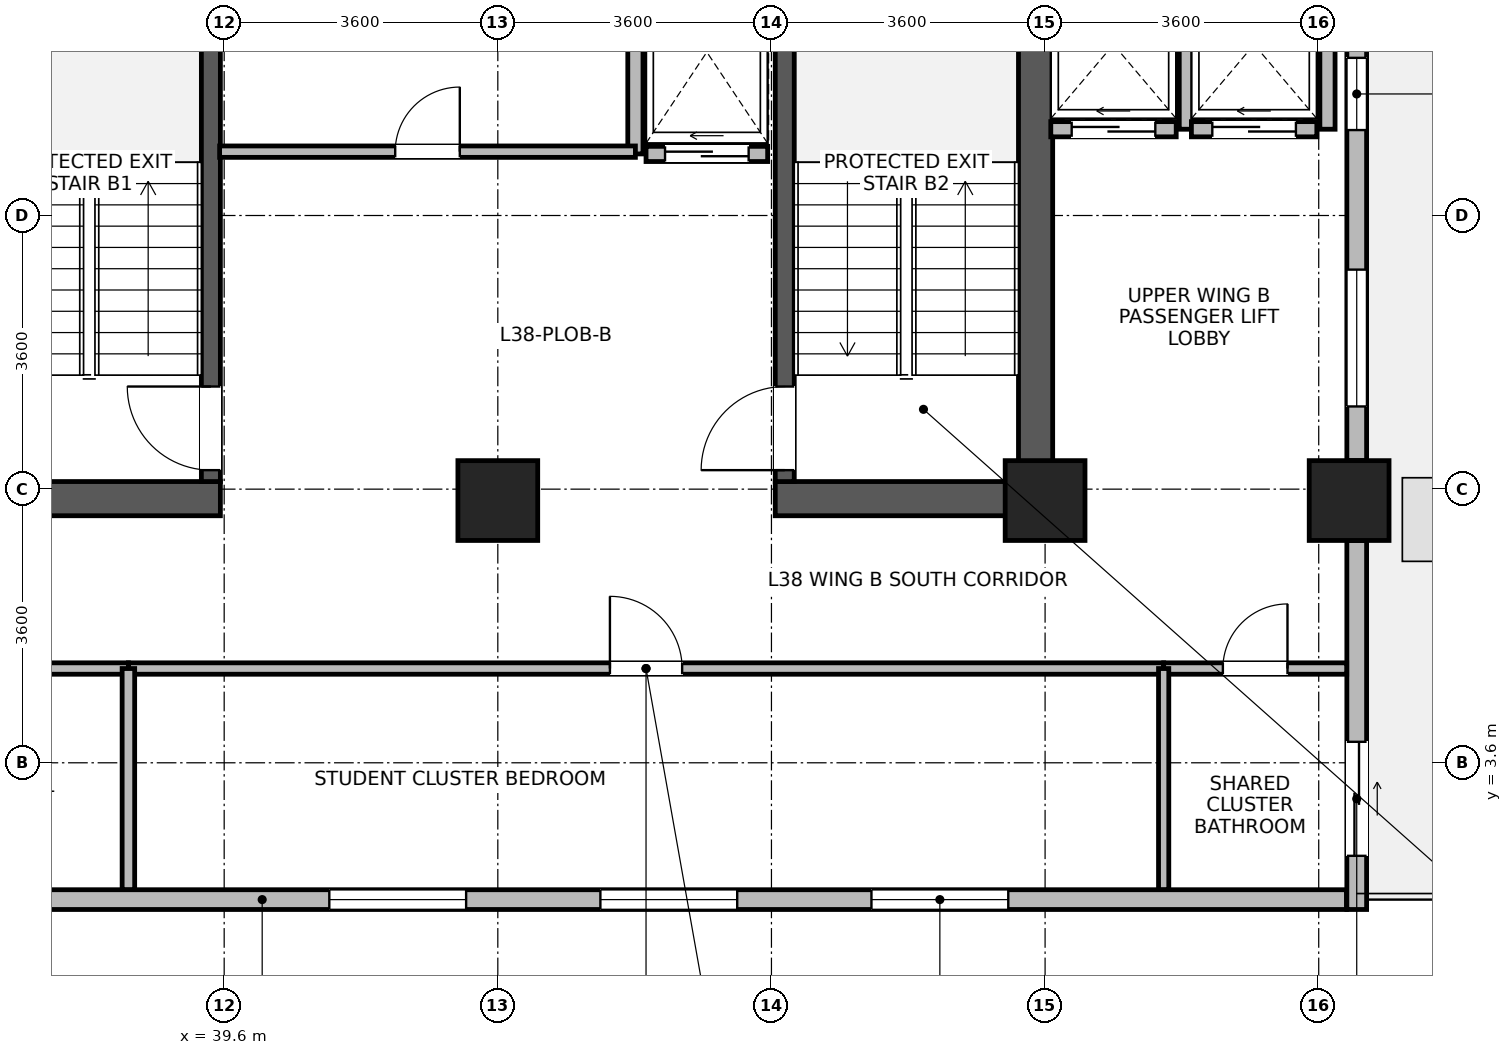
"""IFC4 building model, lengths in metres.
Left out: names, types, materials, properties, quantities, classifications, styles, units other than length and angle.
Written with IfcOpenShell. Run it as: python <this file> out.ifc"""

import sys

from ifc_helpers import new_model, si_unit, direction, frame, frame_2d, origin, origin_2d, place, context, subcontext, project, spatial, rectangle, extrude, source, transform, mapped, element, fill, save


model = new_model("IFC4")
c1 = context("Model", 3, precision=1e-05, world=origin(), true_north=direction((0.0, 1.0)))
c2 = subcontext(c1, "Body", "Model", "MODEL_VIEW")
j1 = project(units=[si_unit("LENGTHUNIT", "METRE"), si_unit("PLANEANGLEUNIT", "RADIAN")], contexts=[c1])
p1 = place(None, origin())
s1 = spatial("IfcSite", under=j1, at=p1, CompositionType="ELEMENT")
p2 = place(p1, origin())
s2 = spatial("IfcBuilding", under=s1, at=p2, CompositionType="ELEMENT")
p3 = place(p2, frame((0.0, 0.0, 151.3)))
s3 = spatial("IfcBuildingStorey", under=s2, at=p3, CompositionType="ELEMENT", Elevation=151.3)
p4 = place(p3, frame((50.275, 6.85, 0.0), z_axis=(0.0, 0.0, 1.0), x_axis=(0.0, 1.0, 0.0)))
e1 = element("IfcWall", 1, at=p4, inside=s3, PredefinedType="SHEAR", context=c2, shape_type="SweptSolid", body=[
    extrude(rectangle(XDim=7.9, YDim=0.45, at=frame_2d((3.95, 0.0))), origin(), (0.0, 0.0, 1.0), 3.46),
])
for number, where, z_axis, x_axis in (
    (2, (36.35, 7.075, 0.0), (0.0, 0.0, 1.0), (1.0, 0.0, 0.0)),
    (3, (46.85, 7.075, 0.0), (0.0, 0.0, 1.0), (1.0, 0.0, 0.0)),
):
    element("IfcWall", number, at=place(p3, frame(where, z_axis=z_axis, x_axis=x_axis)), inside=s3, PredefinedType="SHEAR", context=c2, shape_type="SweptSolid", body=[
        extrude(rectangle(XDim=3.2, YDim=0.45, at=frame_2d((1.6, 0.0))), origin(), (0.0, 0.0, 1.0), 3.46),
    ])
p5 = place(p3, frame((39.425, 7.3, 0.0), z_axis=(0.0, 0.0, 1.0), x_axis=(0.0, 1.0, 0.0)))
e4 = element("IfcWall", 4, at=p5, inside=s3, PredefinedType="SHEAR", context=c2, shape_type="SweptSolid", body=[
    extrude(rectangle(XDim=7.0, YDim=0.25, at=frame_2d((3.5, 0.0))), origin(), (0.0, 0.0, 1.0), 3.46),
])
p6 = place(p5, frame((0.15, 0.0, 0.0)))
e5 = element("IfcOpeningElement", 5, at=p6, cuts=e4, PredefinedType="OPENING", context=c2, shape_type="SweptSolid", body=[
    extrude(rectangle(XDim=1.1, YDim=2.08, at=frame_2d((0.55, 1.04))), frame((0.0, 0.135, 0.0), z_axis=(0.0, -1.0, 0.0), x_axis=(1.0, 0.0, 0.0)), (0.0, 0.0, 1.0), 0.27),
])
p7 = place(p3, frame((46.975, 7.3, 0.0), z_axis=(0.0, 0.0, 1.0), x_axis=(0.0, 1.0, 0.0)))
e6 = element("IfcWall", 6, at=p7, inside=s3, PredefinedType="SHEAR", context=c2, shape_type="SweptSolid", body=[
    extrude(rectangle(XDim=7.0, YDim=0.25, at=frame_2d((3.5, 0.0))), origin(), (0.0, 0.0, 1.0), 3.46),
])
p8 = place(p7, frame((0.15, 0.0, 0.0)))
e7 = element("IfcOpeningElement", 7, at=p8, cuts=e6, PredefinedType="OPENING", context=c2, shape_type="SweptSolid", body=[
    extrude(rectangle(XDim=1.1, YDim=2.08, at=frame_2d((0.55, 1.04))), frame((0.0, 0.135, 0.0), z_axis=(0.0, -1.0, 0.0), x_axis=(1.0, 0.0, 0.0)), (0.0, 0.0, 1.0), 0.27),
])
m1 = source(origin(), c2, "Body", "SweptSolid", [
    extrude(rectangle(XDim=1.05, YDim=1.05, at=origin_2d()), origin(), (0.0, 0.0, 1.0), 3.7),
])
for number, where, z_axis, x_axis in (
    (8, (43.2, 7.05, 0.0), (0.0, 0.0, 1.0), (1.0, 0.0, 0.0)),
    (9, (50.4, 7.05, 0.0), (0.0, 0.0, 1.0), (1.0, 0.0, 0.0)),
    (10, (54.4, 7.05, 0.0), (0.0, 0.0, 1.0), (1.0, 0.0, 0.0)),
):
    element("IfcColumn", number, at=place(p3, frame(where, z_axis=z_axis, x_axis=x_axis)), inside=s3, PredefinedType="COLUMN", context=c2, shape_type="MappedRepresentation", body=[
        mapped(m1, transform((0.0, 0.0, 0.0), x_axis=(1.0, 0.0, 0.0), y_axis=(0.0, 1.0, 0.0), z_axis=(0.0, 0.0, 1.0), scale=1.0)),
    ])
p9 = place(p3, frame((54.365, 1.8, 0.0), z_axis=(0.0, 0.0, 1.0), x_axis=(-1.0, 0.0, 0.0)))
e11 = element("IfcWall", 11, at=p9, inside=s3, PredefinedType="STANDARD", context=c2, shape_type="SweptSolid", body=[
    extrude(rectangle(XDim=28.53, YDim=0.26, at=frame_2d((14.265, 0.0))), origin(), (0.0, 0.0, 1.0), 3.44),
])
p10 = place(p9, frame((4.449, 0.0, 0.85)))
e12 = element("IfcOpeningElement", 12, at=p10, cuts=e11, PredefinedType="OPENING", context=c2, shape_type="SweptSolid", body=[
    extrude(rectangle(XDim=1.8, YDim=1.85, at=frame_2d((0.9, 0.925))), frame((0.0, 0.14, 0.0), z_axis=(0.0, -1.0, 0.0), x_axis=(1.0, 0.0, 0.0)), (0.0, 0.0, 1.0), 0.28),
])
p11 = place(p9, frame((8.016, 0.0, 0.85)))
e13 = element("IfcOpeningElement", 13, at=p11, cuts=e11, PredefinedType="OPENING", context=c2, shape_type="SweptSolid", body=[
    extrude(rectangle(XDim=1.8, YDim=1.85, at=frame_2d((0.9, 0.925))), frame((0.0, 0.14, 0.0), z_axis=(0.0, -1.0, 0.0), x_axis=(1.0, 0.0, 0.0)), (0.0, 0.0, 1.0), 0.28),
])
p12 = place(p9, frame((11.582, 0.0, 0.85)))
e14 = element("IfcOpeningElement", 14, at=p12, cuts=e11, PredefinedType="OPENING", context=c2, shape_type="SweptSolid", body=[
    extrude(rectangle(XDim=1.8, YDim=1.85, at=frame_2d((0.9, 0.925))), frame((0.0, 0.14, 0.0), z_axis=(0.0, -1.0, 0.0), x_axis=(1.0, 0.0, 0.0)), (0.0, 0.0, 1.0), 0.28),
])
p13 = place(p9, frame((18.714, 0.0, 0.85)))
e15 = element("IfcOpeningElement", 15, at=p13, cuts=e11, PredefinedType="OPENING", context=c2, shape_type="SweptSolid", body=[
    extrude(rectangle(XDim=1.8, YDim=1.85, at=frame_2d((0.9, 0.925))), frame((0.0, 0.14, 0.0), z_axis=(0.0, -1.0, 0.0), x_axis=(1.0, 0.0, 0.0)), (0.0, 0.0, 1.0), 0.28),
])
p14 = place(p9, frame((22.281, 0.0, 0.85)))
e16 = element("IfcOpeningElement", 16, at=p14, cuts=e11, PredefinedType="OPENING", context=c2, shape_type="SweptSolid", body=[
    extrude(rectangle(XDim=1.8, YDim=1.85, at=frame_2d((0.9, 0.925))), frame((0.0, 0.14, 0.0), z_axis=(0.0, -1.0, 0.0), x_axis=(1.0, 0.0, 0.0)), (0.0, 0.0, 1.0), 0.28),
])
p15 = place(p9, frame((25.847, 0.0, 0.85)))
e17 = element("IfcOpeningElement", 17, at=p15, cuts=e11, PredefinedType="OPENING", context=c2, shape_type="SweptSolid", body=[
    extrude(rectangle(XDim=1.8, YDim=1.85, at=frame_2d((0.9, 0.925))), frame((0.0, 0.14, 0.0), z_axis=(0.0, -1.0, 0.0), x_axis=(1.0, 0.0, 0.0)), (0.0, 0.0, 1.0), 0.28),
])
p16 = place(p3, frame((54.5, 6.524, 0.0), z_axis=(0.0, 0.0, 1.0), x_axis=(0.0, -1.0, 0.0)))
e18 = element("IfcWall", 18, at=p16, inside=s3, PredefinedType="STANDARD", context=c2, shape_type="SweptSolid", body=[
    extrude(rectangle(XDim=4.854, YDim=0.26, at=frame_2d((2.427, 0.0))), origin(), (0.0, 0.0, 1.0), 3.44),
])
p17 = place(p16, frame((2.648, 0.0, 0.0)))
e19 = element("IfcOpeningElement", 19, at=p17, cuts=e18, PredefinedType="OPENING", context=c2, shape_type="SweptSolid", body=[
    extrude(rectangle(XDim=1.5, YDim=2.15, at=frame_2d((0.75, 1.075))), frame((0.0, 0.14, 0.0), z_axis=(0.0, -1.0, 0.0), x_axis=(1.0, 0.0, 0.0)), (0.0, 0.0, 1.0), 0.28),
])
p18 = place(p3, frame((54.5, 14.024, 0.0), z_axis=(0.0, 0.0, 1.0), x_axis=(0.0, -1.0, 0.0)))
e20 = element("IfcWall", 20, at=p18, inside=s3, PredefinedType="STANDARD", context=c2, shape_type="SweptSolid", body=[
    extrude(rectangle(XDim=6.448, YDim=0.26, at=frame_2d((3.224, 0.0))), origin(), (0.0, 0.0, 1.0), 2.99),
])
p19 = place(p18, frame((3.936, 0.0, 0.85)))
e21 = element("IfcOpeningElement", 21, at=p19, cuts=e20, PredefinedType="OPENING", context=c2, shape_type="SweptSolid", body=[
    extrude(rectangle(XDim=1.8, YDim=1.85, at=frame_2d((0.9, 0.925))), frame((0.0, 0.14, 0.0), z_axis=(0.0, -1.0, 0.0), x_axis=(1.0, 0.0, 0.0)), (0.0, 0.0, 1.0), 0.28),
])
p20 = place(p18, frame((1.15, 0.0, 0.85)))
e22 = element("IfcOpeningElement", 22, at=p20, cuts=e20, PredefinedType="OPENING", context=c2, shape_type="SweptSolid", body=[
    extrude(rectangle(XDim=0.95, YDim=1.75, at=frame_2d((0.475, 0.875))), frame((0.0, 0.14, 0.0), z_axis=(0.0, -1.0, 0.0), x_axis=(1.0, 0.0, 0.0)), (0.0, 0.0, 1.0), 0.28),
])
p21 = place(p3, frame((50.475, 11.935, 0.0), z_axis=(0.0, 0.0, 1.0), x_axis=(1.0, 0.0, 0.0)))
e23 = element("IfcWall", 23, at=p21, inside=s3, PredefinedType="PARTITIONING", context=c2, shape_type="SweptSolid", body=[
    extrude(rectangle(XDim=1.65, YDim=0.2, at=frame_2d((0.825, 0.0))), origin(), (0.0, 0.0, 1.0), 3.44),
])
p22 = place(p21, frame((0.275, 0.0, 0.0)))
e24 = element("IfcOpeningElement", 24, at=p22, cuts=e23, PredefinedType="OPENING", context=c2, shape_type="SweptSolid", body=[
    extrude(rectangle(XDim=1.1, YDim=2.12, at=frame_2d((0.55, 1.06))), frame((0.0, 0.11, 0.0), z_axis=(0.0, -1.0, 0.0), x_axis=(1.0, 0.0, 0.0)), (0.0, 0.0, 1.0), 0.22),
])
p23 = place(p3, frame((52.265, 11.935, 0.0), z_axis=(0.0, 0.0, 1.0), x_axis=(0.0, 1.0, 0.0)))
e25 = element("IfcWall", 25, at=p23, inside=s3, PredefinedType="PARTITIONING", context=c2, shape_type="SweptSolid", body=[
    extrude(rectangle(XDim=2.23, YDim=0.2, at=frame_2d((1.115, 0.0))), origin(), (0.0, 0.0, 1.0), 3.44),
])
p24 = place(p3, frame((52.325, 11.935, 0.0), z_axis=(0.0, 0.0, 1.0), x_axis=(1.0, 0.0, 0.0)))
e26 = element("IfcWall", 26, at=p24, inside=s3, PredefinedType="PARTITIONING", context=c2, shape_type="SweptSolid", body=[
    extrude(rectangle(XDim=1.65, YDim=0.2, at=frame_2d((0.825, 0.0))), origin(), (0.0, 0.0, 1.0), 3.44),
])
p25 = place(p24, frame((0.275, 0.0, 0.0)))
e27 = element("IfcOpeningElement", 27, at=p25, cuts=e26, PredefinedType="OPENING", context=c2, shape_type="SweptSolid", body=[
    extrude(rectangle(XDim=1.1, YDim=2.12, at=frame_2d((0.55, 1.06))), frame((0.0, 0.11, 0.0), z_axis=(0.0, -1.0, 0.0), x_axis=(1.0, 0.0, 0.0)), (0.0, 0.0, 1.0), 0.22),
])
p26 = place(p3, frame((54.115, 11.935, 0.0), z_axis=(0.0, 0.0, 1.0), x_axis=(0.0, 1.0, 0.0)))
e28 = element("IfcWall", 28, at=p26, inside=s3, PredefinedType="PARTITIONING", context=c2, shape_type="SweptSolid", body=[
    extrude(rectangle(XDim=2.23, YDim=0.2, at=frame_2d((1.115, 0.0))), origin(), (0.0, 0.0, 1.0), 2.99),
])
p27 = place(p3, frame((45.15, 11.61, 0.0), z_axis=(0.0, 0.0, 1.0), x_axis=(1.0, 0.0, 0.0)))
e29 = element("IfcWall", 29, at=p27, inside=s3, PredefinedType="PARTITIONING", context=c2, shape_type="SweptSolid", body=[
    extrude(rectangle(XDim=1.6, YDim=0.2, at=frame_2d((0.8, 0.0))), origin(), (0.0, 0.0, 1.0), 3.44),
])
p28 = place(p27, frame((0.25, 0.0, 0.0)))
e30 = element("IfcOpeningElement", 30, at=p28, cuts=e29, PredefinedType="OPENING", context=c2, shape_type="SweptSolid", body=[
    extrude(rectangle(XDim=1.1, YDim=2.12, at=frame_2d((0.55, 1.06))), frame((0.0, 0.11, 0.0), z_axis=(0.0, -1.0, 0.0), x_axis=(1.0, 0.0, 0.0)), (0.0, 0.0, 1.0), 0.22),
])
p29 = place(p3, frame((45.01, 11.61, 0.0), z_axis=(0.0, 0.0, 1.0), x_axis=(0.0, 1.0, 0.0)))
e31 = element("IfcWall", 31, at=p29, inside=s3, PredefinedType="PARTITIONING", context=c2, shape_type="SweptSolid", body=[
    extrude(rectangle(XDim=2.68, YDim=0.2, at=frame_2d((1.34, 0.0))), origin(), (0.0, 0.0, 1.0), 3.44),
])
p30 = place(p3, frame((38.34, 4.84, 0.0), z_axis=(0.0, 0.0, 1.0), x_axis=(1.0, 0.0, 0.0)))
e32 = element("IfcWall", 32, at=p30, inside=s3, PredefinedType="PARTITIONING", context=c2, shape_type="SweptSolid", body=[
    extrude(rectangle(XDim=13.62, YDim=0.15, at=frame_2d((6.81, 0.0))), origin(), (0.0, 0.0, 1.0), 3.44),
])
p31 = place(p30, frame((6.335, 0.0, 0.0)))
e33 = element("IfcOpeningElement", 33, at=p31, cuts=e32, PredefinedType="OPENING", context=c2, shape_type="SweptSolid", body=[
    extrude(rectangle(XDim=0.95, YDim=2.1, at=frame_2d((0.475, 1.05))), frame((0.0, 0.085, 0.0), z_axis=(0.0, -1.0, 0.0), x_axis=(1.0, 0.0, 0.0)), (0.0, 0.0, 1.0), 0.17),
])
p32 = place(p3, frame((25.832, 4.84, 0.0), z_axis=(0.0, 0.0, 1.0), x_axis=(1.0, 0.0, 0.0)))
e34 = element("IfcWall", 34, at=p32, inside=s3, PredefinedType="PARTITIONING", context=c2, shape_type="SweptSolid", body=[
    extrude(rectangle(XDim=12.508, YDim=0.15, at=frame_2d((6.254, 0.0))), origin(), (0.0, 0.0, 1.0), 3.44),
])
p33 = place(p32, frame((5.779, 0.0, 0.0)))
e35 = element("IfcOpeningElement", 35, at=p33, cuts=e34, PredefinedType="OPENING", context=c2, shape_type="SweptSolid", body=[
    extrude(rectangle(XDim=0.95, YDim=2.1, at=frame_2d((0.475, 1.05))), frame((0.0, 0.085, 0.0), z_axis=(0.0, -1.0, 0.0), x_axis=(1.0, 0.0, 0.0)), (0.0, 0.0, 1.0), 0.17),
])
p34 = place(p3, frame((39.54, 11.64, 0.0), z_axis=(0.0, 0.0, 1.0), x_axis=(1.0, 0.0, 0.0)))
e36 = element("IfcWall", 36, at=p34, inside=s3, PredefinedType="PARTITIONING", context=c2, shape_type="SweptSolid", body=[
    extrude(rectangle(XDim=5.47, YDim=0.15, at=frame_2d((2.735, 0.0))), origin(), (0.0, 0.0, 1.0), 3.44),
])
p35 = place(p34, frame((2.31, 0.0, 0.0)))
e37 = element("IfcOpeningElement", 37, at=p35, cuts=e36, PredefinedType="OPENING", context=c2, shape_type="SweptSolid", body=[
    extrude(rectangle(XDim=0.85, YDim=2.04, at=frame_2d((0.425, 1.02))), frame((0.0, 0.085, 0.0), z_axis=(0.0, -1.0, 0.0), x_axis=(1.0, 0.0, 0.0)), (0.0, 0.0, 1.0), 0.17),
])
p36 = place(p3, frame((51.96, 4.84, 0.0), z_axis=(0.0, 0.0, 1.0), x_axis=(1.0, 0.0, 0.0)))
e38 = element("IfcWall", 38, at=p36, inside=s3, PredefinedType="PARTITIONING", context=c2, shape_type="SweptSolid", body=[
    extrude(rectangle(XDim=2.408, YDim=0.15, at=frame_2d((1.204, 0.0))), origin(), (0.0, 0.0, 1.0), 3.44),
])
p37 = place(p36, frame((0.779, 0.0, 0.0)))
e39 = element("IfcOpeningElement", 39, at=p37, cuts=e38, PredefinedType="OPENING", context=c2, shape_type="SweptSolid", body=[
    extrude(rectangle(XDim=0.85, YDim=2.04, at=frame_2d((0.425, 1.02))), frame((0.0, 0.085, 0.0), z_axis=(0.0, -1.0, 0.0), x_axis=(1.0, 0.0, 0.0)), (0.0, 0.0, 1.0), 0.17),
])
p38 = place(p3, frame((38.34, 1.932, 0.0), z_axis=(0.0, 0.0, 1.0), x_axis=(0.0, 1.0, 0.0)))
e40 = element("IfcWall", 40, at=p38, inside=s3, PredefinedType="PARTITIONING", context=c2, shape_type="SweptSolid", body=[
    extrude(rectangle(XDim=2.908, YDim=0.165, at=frame_2d((1.454, 0.0))), origin(), (0.0, 0.0, 1.0), 3.44),
])
p39 = place(p3, frame((51.96, 1.932, 0.0), z_axis=(0.0, 0.0, 1.0), x_axis=(0.0, 1.0, 0.0)))
e41 = element("IfcWall", 41, at=p39, inside=s3, PredefinedType="PARTITIONING", context=c2, shape_type="SweptSolid", body=[
    extrude(rectangle(XDim=2.908, YDim=0.135, at=frame_2d((1.454, 0.0))), origin(), (0.0, 0.0, 1.0), 3.44),
])
p40 = place(p10, origin())
e42 = element("IfcWindow", 42, at=p40, inside=s3, PartitioningType="SINGLE_PANEL", PredefinedType="WINDOW", context=c2, shape_type="SweptSolid", body=[
    extrude(rectangle(XDim=1.8, YDim=1.85, at=frame_2d((0.9, 0.925))), frame((0.0, 0.03, 0.0), z_axis=(0.0, -1.0, 0.0), x_axis=(1.0, 0.0, 0.0)), (0.0, 0.0, 1.0), 0.06),
])
fill(e12, e42)
p41 = place(p11, origin())
e43 = element("IfcWindow", 43, at=p41, inside=s3, PartitioningType="SINGLE_PANEL", PredefinedType="WINDOW", context=c2, shape_type="SweptSolid", body=[
    extrude(rectangle(XDim=1.8, YDim=1.85, at=frame_2d((0.9, 0.925))), frame((0.0, 0.03, 0.0), z_axis=(0.0, -1.0, 0.0), x_axis=(1.0, 0.0, 0.0)), (0.0, 0.0, 1.0), 0.06),
])
fill(e13, e43)
p42 = place(p12, origin())
e44 = element("IfcWindow", 44, at=p42, inside=s3, PartitioningType="SINGLE_PANEL", PredefinedType="WINDOW", context=c2, shape_type="SweptSolid", body=[
    extrude(rectangle(XDim=1.8, YDim=1.85, at=frame_2d((0.9, 0.925))), frame((0.0, 0.03, 0.0), z_axis=(0.0, -1.0, 0.0), x_axis=(1.0, 0.0, 0.0)), (0.0, 0.0, 1.0), 0.06),
])
fill(e14, e44)
p43 = place(p17, origin())
e45 = element("IfcDoor", 45, at=p43, inside=s3, OperationType="SLIDING_TO_LEFT", PredefinedType="DOOR", context=c2, shape_type="SweptSolid", body=[
    extrude(rectangle(XDim=1.5, YDim=2.15, at=frame_2d((0.75, 1.075))), frame((0.0, 0.025, 0.0), z_axis=(0.0, -1.0, 0.0), x_axis=(1.0, 0.0, 0.0)), (0.0, 0.0, 1.0), 0.05),
])
fill(e19, e45)
p44 = place(p19, origin())
e46 = element("IfcWindow", 46, at=p44, inside=s3, PartitioningType="SINGLE_PANEL", PredefinedType="WINDOW", context=c2, shape_type="SweptSolid", body=[
    extrude(rectangle(XDim=1.8, YDim=1.85, at=frame_2d((0.9, 0.925))), frame((0.0, 0.03, 0.0), z_axis=(0.0, -1.0, 0.0), x_axis=(1.0, 0.0, 0.0)), (0.0, 0.0, 1.0), 0.06),
])
fill(e21, e46)
p45 = place(p20, origin())
e47 = element("IfcWindow", 47, at=p45, inside=s3, PartitioningType="SINGLE_PANEL", PredefinedType="WINDOW", context=c2, shape_type="SweptSolid", body=[
    extrude(rectangle(XDim=0.95, YDim=1.75, at=frame_2d((0.475, 0.875))), frame((0.0, 0.03, 0.0), z_axis=(0.0, -1.0, 0.0), x_axis=(1.0, 0.0, 0.0)), (0.0, 0.0, 1.0), 0.06),
])
fill(e22, e47)
p46 = place(p6, origin())
e48 = element("IfcDoor", 48, at=p46, inside=s3, OperationType="SINGLE_SWING_RIGHT", PredefinedType="DOOR", context=c2, shape_type="SweptSolid", body=[
    extrude(rectangle(XDim=1.1, YDim=2.08, at=frame_2d((0.55, 1.04))), frame((0.0, 0.025, 0.0), z_axis=(0.0, -1.0, 0.0), x_axis=(1.0, 0.0, 0.0)), (0.0, 0.0, 1.0), 0.05),
])
fill(e5, e48)
p47 = place(p8, origin())
e49 = element("IfcDoor", 49, at=p47, inside=s3, OperationType="SINGLE_SWING_LEFT", PredefinedType="DOOR", context=c2, shape_type="SweptSolid", body=[
    extrude(rectangle(XDim=1.1, YDim=2.08, at=frame_2d((0.55, 1.04))), frame((0.0, 0.025, 0.0), z_axis=(0.0, -1.0, 0.0), x_axis=(1.0, 0.0, 0.0)), (0.0, 0.0, 1.0), 0.05),
])
fill(e7, e49)
p48 = place(p22, origin())
e50 = element("IfcDoor", 50, at=p48, inside=s3, OperationType="SLIDING_TO_LEFT", PredefinedType="DOOR", context=c2, shape_type="SweptSolid", body=[
    extrude(rectangle(XDim=1.1, YDim=2.12, at=frame_2d((0.55, 1.06))), frame((0.0, 0.025, 0.0), z_axis=(0.0, -1.0, 0.0), x_axis=(1.0, 0.0, 0.0)), (0.0, 0.0, 1.0), 0.05),
])
fill(e24, e50)
p49 = place(p25, origin())
e51 = element("IfcDoor", 51, at=p49, inside=s3, OperationType="SLIDING_TO_LEFT", PredefinedType="DOOR", context=c2, shape_type="SweptSolid", body=[
    extrude(rectangle(XDim=1.1, YDim=2.12, at=frame_2d((0.55, 1.06))), frame((0.0, 0.025, 0.0), z_axis=(0.0, -1.0, 0.0), x_axis=(1.0, 0.0, 0.0)), (0.0, 0.0, 1.0), 0.05),
])
fill(e27, e51)
p50 = place(p28, origin())
e52 = element("IfcDoor", 52, at=p50, inside=s3, OperationType="SLIDING_TO_LEFT", PredefinedType="DOOR", context=c2, shape_type="SweptSolid", body=[
    extrude(rectangle(XDim=1.1, YDim=2.12, at=frame_2d((0.55, 1.06))), frame((0.0, 0.025, 0.0), z_axis=(0.0, -1.0, 0.0), x_axis=(1.0, 0.0, 0.0)), (0.0, 0.0, 1.0), 0.05),
])
fill(e30, e52)
p51 = place(p31, origin())
e53 = element("IfcDoor", 53, at=p51, inside=s3, OperationType="SINGLE_SWING_LEFT", PredefinedType="DOOR", context=c2, shape_type="SweptSolid", body=[
    extrude(rectangle(XDim=0.95, YDim=2.1, at=frame_2d((0.475, 1.05))), frame((0.0, 0.025, 0.0), z_axis=(0.0, -1.0, 0.0), x_axis=(1.0, 0.0, 0.0)), (0.0, 0.0, 1.0), 0.05),
])
fill(e33, e53)
p52 = place(p35, origin())
e54 = element("IfcDoor", 54, at=p52, inside=s3, OperationType="SINGLE_SWING_RIGHT", PredefinedType="DOOR", context=c2, shape_type="SweptSolid", body=[
    extrude(rectangle(XDim=0.85, YDim=2.04, at=frame_2d((0.425, 1.02))), frame((0.0, 0.025, 0.0), z_axis=(0.0, -1.0, 0.0), x_axis=(1.0, 0.0, 0.0)), (0.0, 0.0, 1.0), 0.05),
])
fill(e37, e54)
p53 = place(p37, origin())
e55 = element("IfcDoor", 55, at=p53, inside=s3, OperationType="SINGLE_SWING_RIGHT", PredefinedType="DOOR", context=c2, shape_type="SweptSolid", body=[
    extrude(rectangle(XDim=0.85, YDim=2.04, at=frame_2d((0.425, 1.02))), frame((0.0, 0.025, 0.0), z_axis=(0.0, -1.0, 0.0), x_axis=(1.0, 0.0, 0.0)), (0.0, 0.0, 1.0), 0.05),
])
fill(e39, e55)
save(model, sys.argv[1])
